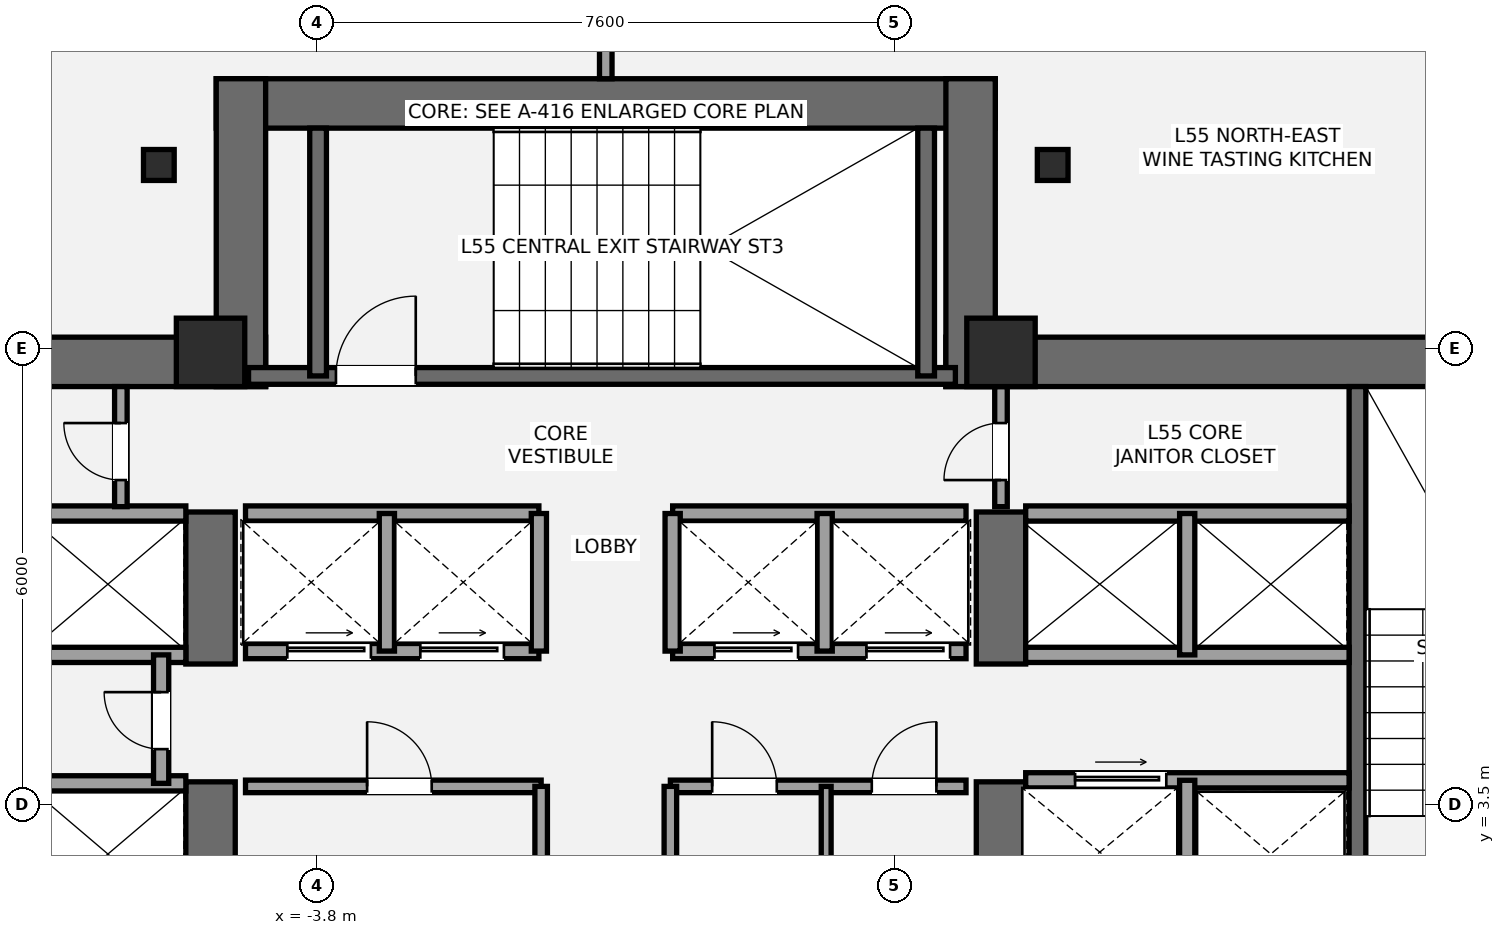
"""IFC4 building model, lengths in metres.
Left out: names, types, materials, properties, quantities, classifications, styles, units other than length and angle.
Written with IfcOpenShell. Run it as: python <this file> out.ifc"""

import sys

from ifc_helpers import new_model, si_unit, direction, frame, frame_2d, origin, origin_2d, place, context, subcontext, project, spatial, rectangle, i_section, extrude, element, fill, save


model = new_model("IFC4")
c1 = context("Model", 3, precision=1e-05, world=origin(), true_north=direction((0.0, 1.0)))
c2 = subcontext(c1, "Body", "Model", "MODEL_VIEW")
j1 = project(units=[si_unit("LENGTHUNIT", "METRE"), si_unit("PLANEANGLEUNIT", "RADIAN")], contexts=[c1])
p1 = place(None, origin())
s1 = spatial("IfcSite", under=j1, at=p1, CompositionType="ELEMENT")
p2 = place(p1, origin())
s2 = spatial("IfcBuilding", under=s1, at=p2, CompositionType="ELEMENT")
p3 = place(p2, frame((0.0, 0.0, 198.2)))
s3 = spatial("IfcBuildingStorey", under=s2, at=p3, CompositionType="ELEMENT", Elevation=198.2)
p4 = place(p3, frame((-13.8, 9.325, 0.0), z_axis=(0.0, 0.0, 1.0), x_axis=(1.0, 0.0, 0.0)))
e1 = element("IfcWall", 1, at=p4, inside=s3, PredefinedType="SHEAR", context=c2, shape_type="SweptSolid", body=[
    extrude(rectangle(XDim=9.325, YDim=0.65, at=frame_2d((4.663, 0.0))), origin(), (0.0, 0.0, 1.0), 3.2),
])
p5 = place(p3, frame((-5.2, 1.2, 0.0), z_axis=(0.0, 0.0, 1.0), x_axis=(0.0, 1.0, 0.0)))
e2 = element("IfcWall", 2, at=p5, inside=s3, PredefinedType="SHEAR", context=c2, shape_type="SweptSolid", body=[
    extrude(rectangle(XDim=2.6, YDim=0.65, at=frame_2d((1.3, 0.0))), origin(), (0.0, 0.0, 1.0), 3.2),
])
p6 = place(p3, frame((-5.2, 5.35, 0.0), z_axis=(0.0, 0.0, 1.0), x_axis=(0.0, 1.0, 0.0)))
e3 = element("IfcWall", 3, at=p6, inside=s3, PredefinedType="SHEAR", context=c2, shape_type="SweptSolid", body=[
    extrude(rectangle(XDim=2.0, YDim=0.65, at=frame_2d((1.0, 0.0))), origin(), (0.0, 0.0, 1.0), 3.2),
])
p7 = place(p3, frame((4.475, 9.325, 0.0), z_axis=(0.0, 0.0, 1.0), x_axis=(1.0, 0.0, 0.0)))
e4 = element("IfcWall", 4, at=p7, inside=s3, PredefinedType="SHEAR", context=c2, shape_type="SweptSolid", body=[
    extrude(rectangle(XDim=9.325, YDim=0.65, at=frame_2d((4.663, 0.0))), origin(), (0.0, 0.0, 1.0), 3.2),
])
p8 = place(p3, frame((5.2, 1.2, 0.0), z_axis=(0.0, 0.0, 1.0), x_axis=(0.0, 1.0, 0.0)))
e5 = element("IfcWall", 5, at=p8, inside=s3, PredefinedType="SHEAR", context=c2, shape_type="SweptSolid", body=[
    extrude(rectangle(XDim=2.6, YDim=0.65, at=frame_2d((1.3, 0.0))), origin(), (0.0, 0.0, 1.0), 3.2),
])
p9 = place(p3, frame((5.2, 5.35, 0.0), z_axis=(0.0, 0.0, 1.0), x_axis=(0.0, 1.0, 0.0)))
e6 = element("IfcWall", 6, at=p9, inside=s3, PredefinedType="SHEAR", context=c2, shape_type="SweptSolid", body=[
    extrude(rectangle(XDim=2.0, YDim=0.65, at=frame_2d((1.0, 0.0))), origin(), (0.0, 0.0, 1.0), 3.2),
])
p10 = place(p3, frame((9.89, 1.85, 0.0), z_axis=(0.0, 0.0, 1.0), x_axis=(0.0, 1.0, 0.0)))
e7 = element("IfcWall", 7, at=p10, inside=s3, PredefinedType="SHEAR", context=c2, shape_type="SweptSolid", body=[
    extrude(rectangle(XDim=7.15, YDim=0.22, at=frame_2d((3.575, 0.0))), origin(), (0.0, 0.0, 1.0), 3.2),
])
p11 = place(p3, frame((-5.125, 12.725, 0.0), z_axis=(0.0, 0.0, 1.0), x_axis=(1.0, 0.0, 0.0)))
e8 = element("IfcWall", 8, at=p11, inside=s3, PredefinedType="SHEAR", context=c2, shape_type="SweptSolid", body=[
    extrude(rectangle(XDim=10.25, YDim=0.65, at=frame_2d((5.125, 0.0))), origin(), (0.0, 0.0, 1.0), 3.2),
])
for number, where, z_axis, x_axis in (
    (9, (-4.8, 9.0, 0.0), (0.0, 0.0, 1.0), (0.0, 1.0, 0.0)),
    (10, (4.8, 9.0, 0.0), (0.0, 0.0, 1.0), (0.0, 1.0, 0.0)),
):
    element("IfcWall", number, at=place(p3, frame(where, z_axis=z_axis, x_axis=x_axis)), inside=s3, PredefinedType="SHEAR", context=c2, shape_type="SweptSolid", body=[
        extrude(rectangle(XDim=4.05, YDim=0.65, at=frame_2d((2.025, 0.0))), origin(), (0.0, 0.0, 1.0), 3.2),
    ])
p12 = place(p3, frame((-4.7, 9.14, 0.0), z_axis=(0.0, 0.0, 1.0), x_axis=(1.0, 0.0, 0.0)))
e11 = element("IfcWall", 11, at=p12, inside=s3, PredefinedType="SHEAR", context=c2, shape_type="SweptSolid", body=[
    extrude(rectangle(XDim=9.3, YDim=0.22, at=frame_2d((4.65, 0.0))), origin(), (0.0, 0.0, 1.0), 3.2),
])
p13 = place(p12, frame((1.15, 0.0, 0.0)))
e12 = element("IfcOpeningElement", 12, at=p13, cuts=e11, PredefinedType="OPENING", context=c2, shape_type="SweptSolid", body=[
    extrude(rectangle(XDim=1.05, YDim=2.15, at=frame_2d((0.525, 1.075))), frame((0.0, 0.12, 0.0), z_axis=(0.0, -1.0, 0.0), x_axis=(1.0, 0.0, 0.0)), (0.0, 0.0, 1.0), 0.24),
])
for number, where, z_axis, x_axis in (
    (13, (-3.785, 9.14, 0.0), (0.0, 0.0, 1.0), (0.0, 1.0, 0.0)),
    (14, (4.215, 9.14, 0.0), (0.0, 0.0, 1.0), (0.0, 1.0, 0.0)),
):
    element("IfcWall", number, at=place(p3, frame(where, z_axis=z_axis, x_axis=x_axis)), inside=s3, PredefinedType="SHEAR", context=c2, shape_type="SweptSolid", body=[
        extrude(rectangle(XDim=3.26, YDim=0.22, at=frame_2d((1.63, 0.0))), origin(), (0.0, 0.0, 1.0), 3.2),
    ])
for number, where, z_axis, x_axis in (
    (15, (-5.2, 9.45, 0.0), (0.0, 0.0, 1.0), (1.0, 0.0, 0.0)),
    (16, (5.2, 9.45, 0.0), (0.0, 0.0, 1.0), (1.0, 0.0, 0.0)),
):
    element("IfcColumn", number, at=place(p3, frame(where, z_axis=z_axis, x_axis=x_axis)), inside=s3, PredefinedType="COLUMN", context=c2, shape_type="SweptSolid", body=[
        extrude(rectangle(XDim=0.9, YDim=0.9, at=origin_2d()), origin(), (0.0, 0.0, 1.0), 3.2),
    ])
for number, where, z_axis, x_axis in (
    (17, (5.88, 11.915, 0.0), (0.0, 0.0, 1.0), (1.0, 0.0, 0.0)),
    (18, (-5.88, 11.915, 0.0), (0.0, 0.0, 1.0), (1.0, 0.0, 0.0)),
):
    element("IfcColumn", number, at=place(p3, frame(where, z_axis=z_axis, x_axis=x_axis)), inside=s3, PredefinedType="COLUMN", context=c2, shape_type="SweptSolid", body=[
        extrude(i_section(OverallWidth=0.404, OverallDepth=0.407, WebThickness=0.027, FlangeThickness=0.044, at=origin_2d()), origin(), (0.0, 0.0, 1.0), 3.2),
    ])
for number, where, z_axis, x_axis in (
    (19, (-9.78, 3.78, 0.0), (0.0, 0.0, 1.0), (1.0, 0.0, 0.0)),
    (20, (-9.78, 5.47, 0.0), (0.0, 0.0, 1.0), (1.0, 0.0, 0.0)),
    (21, (-9.78, 7.33, 0.0), (0.0, 0.0, 1.0), (1.0, 0.0, 0.0)),
):
    element("IfcWall", number, at=place(p3, frame(where, z_axis=z_axis, x_axis=x_axis)), inside=s3, PredefinedType="SOLIDWALL", context=c2, shape_type="SweptSolid", body=[
        extrude(rectangle(XDim=4.255, YDim=0.2, at=frame_2d((2.127, 0.0))), origin(), (0.0, 0.0, 1.0), 2.96),
    ])
p14 = place(p3, frame((-5.85, 3.78, 0.0), z_axis=(0.0, 0.0, 1.0), x_axis=(0.0, 1.0, 0.0)))
e22 = element("IfcWall", 22, at=p14, inside=s3, PredefinedType="SOLIDWALL", context=c2, shape_type="SweptSolid", body=[
    extrude(rectangle(XDim=1.69, YDim=0.2, at=frame_2d((0.845, 0.0))), origin(), (0.0, 0.0, 1.0), 2.96),
])
p15 = place(p14, frame((0.45, 0.0, 0.0)))
e23 = element("IfcOpeningElement", 23, at=p15, cuts=e22, PredefinedType="OPENING", context=c2, shape_type="SweptSolid", body=[
    extrude(rectangle(XDim=0.75, YDim=2.1, at=frame_2d((0.375, 1.05))), frame((0.0, 0.11, 0.0), z_axis=(0.0, -1.0, 0.0), x_axis=(1.0, 0.0, 0.0)), (0.0, 0.0, 1.0), 0.22),
])
p16 = place(p3, frame((5.525, 3.82, 0.0), z_axis=(0.0, 0.0, 1.0), x_axis=(1.0, 0.0, 0.0)))
e24 = element("IfcWall", 24, at=p16, inside=s3, PredefinedType="SOLIDWALL", context=c2, shape_type="SweptSolid", body=[
    extrude(rectangle(XDim=4.255, YDim=0.2, at=frame_2d((2.127, 0.0))), origin(), (0.0, 0.0, 1.0), 2.96),
])
p17 = place(p16, frame((0.65, 0.0, 0.0)))
e25 = element("IfcOpeningElement", 25, at=p17, cuts=e24, PredefinedType="OPENING", context=c2, shape_type="SweptSolid", body=[
    extrude(rectangle(XDim=1.2, YDim=2.2, at=frame_2d((0.6, 1.1))), frame((0.0, 0.11, 0.0), z_axis=(0.0, -1.0, 0.0), x_axis=(1.0, 0.0, 0.0)), (0.0, 0.0, 1.0), 0.22),
])
p18 = place(p3, frame((7.65, 1.85, 0.0), z_axis=(0.0, 0.0, 1.0), x_axis=(0.0, 1.0, 0.0)))
e26 = element("IfcWall", 26, at=p18, inside=s3, PredefinedType="SOLIDWALL", context=c2, shape_type="SweptSolid", body=[
    extrude(rectangle(XDim=1.97, YDim=0.2, at=frame_2d((0.985, 0.0))), origin(), (0.0, 0.0, 1.0), 2.96),
])
for number, where, z_axis, x_axis in (
    (27, (5.525, 5.47, 0.0), (0.0, 0.0, 1.0), (1.0, 0.0, 0.0)),
    (28, (5.525, 7.33, 0.0), (0.0, 0.0, 1.0), (1.0, 0.0, 0.0)),
):
    element("IfcWall", number, at=place(p3, frame(where, z_axis=z_axis, x_axis=x_axis)), inside=s3, PredefinedType="SOLIDWALL", context=c2, shape_type="SweptSolid", body=[
        extrude(rectangle(XDim=4.255, YDim=0.2, at=frame_2d((2.127, 0.0))), origin(), (0.0, 0.0, 1.0), 2.96),
    ])
p19 = place(p3, frame((7.65, 5.47, 0.0), z_axis=(0.0, 0.0, 1.0), x_axis=(0.0, 1.0, 0.0)))
e29 = element("IfcWall", 29, at=p19, inside=s3, PredefinedType="SOLIDWALL", context=c2, shape_type="SweptSolid", body=[
    extrude(rectangle(XDim=1.86, YDim=0.2, at=frame_2d((0.93, 0.0))), origin(), (0.0, 0.0, 1.0), 2.96),
])
p20 = place(p3, frame((-4.74, 3.74, 0.0), z_axis=(0.0, 0.0, 1.0), x_axis=(1.0, 0.0, 0.0)))
e30 = element("IfcWall", 30, at=p20, inside=s3, PredefinedType="PARTITIONING", context=c2, shape_type="SweptSolid", body=[
    extrude(rectangle(XDim=3.89, YDim=0.165, at=frame_2d((1.945, 0.0))), origin(), (0.0, 0.0, 1.0), 2.96),
])
p21 = place(p20, frame((1.6, 0.0, 0.0)))
e31 = element("IfcOpeningElement", 31, at=p21, cuts=e30, PredefinedType="OPENING", context=c2, shape_type="SweptSolid", body=[
    extrude(rectangle(XDim=0.85, YDim=2.1, at=frame_2d((0.425, 1.05))), frame((0.0, 0.093, 0.0), z_axis=(0.0, -1.0, 0.0), x_axis=(1.0, 0.0, 0.0)), (0.0, 0.0, 1.0), 0.185),
])
p22 = place(p3, frame((-0.85, 1.92, 0.0), z_axis=(0.0, 0.0, 1.0), x_axis=(0.0, 1.0, 0.0)))
e32 = element("IfcWall", 32, at=p22, inside=s3, PredefinedType="PARTITIONING", context=c2, shape_type="SweptSolid", body=[
    extrude(rectangle(XDim=1.82, YDim=0.165, at=frame_2d((0.91, 0.0))), origin(), (0.0, 0.0, 1.0), 2.96),
])
p23 = place(p3, frame((0.85, 3.74, 0.0), z_axis=(0.0, 0.0, 1.0), x_axis=(1.0, 0.0, 0.0)))
e33 = element("IfcWall", 33, at=p23, inside=s3, PredefinedType="PARTITIONING", context=c2, shape_type="SweptSolid", body=[
    extrude(rectangle(XDim=3.89, YDim=0.165, at=frame_2d((1.945, 0.0))), origin(), (0.0, 0.0, 1.0), 2.96),
])
p24 = place(p23, frame((0.55, 0.0, 0.0)))
e34 = element("IfcOpeningElement", 34, at=p24, cuts=e33, PredefinedType="OPENING", context=c2, shape_type="SweptSolid", body=[
    extrude(rectangle(XDim=0.85, YDim=2.1, at=frame_2d((0.425, 1.05))), frame((0.0, 0.093, 0.0), z_axis=(0.0, -1.0, 0.0), x_axis=(1.0, 0.0, 0.0)), (0.0, 0.0, 1.0), 0.185),
])
p25 = place(p23, frame((2.65, 0.0, 0.0)))
e35 = element("IfcOpeningElement", 35, at=p25, cuts=e33, PredefinedType="OPENING", context=c2, shape_type="SweptSolid", body=[
    extrude(rectangle(XDim=0.85, YDim=2.1, at=frame_2d((0.425, 1.05))), frame((0.0, 0.093, 0.0), z_axis=(0.0, -1.0, 0.0), x_axis=(1.0, 0.0, 0.0)), (0.0, 0.0, 1.0), 0.185),
])
p26 = place(p3, frame((0.85, 1.92, 0.0), z_axis=(0.0, 0.0, 1.0), x_axis=(0.0, 1.0, 0.0)))
e36 = element("IfcWall", 36, at=p26, inside=s3, PredefinedType="PARTITIONING", context=c2, shape_type="SweptSolid", body=[
    extrude(rectangle(XDim=1.82, YDim=0.165, at=frame_2d((0.91, 0.0))), origin(), (0.0, 0.0, 1.0), 2.96),
])
p27 = place(p3, frame((2.9, 1.92, 0.0), z_axis=(0.0, 0.0, 1.0), x_axis=(0.0, 1.0, 0.0)))
e37 = element("IfcWall", 37, at=p27, inside=s3, PredefinedType="PARTITIONING", context=c2, shape_type="SweptSolid", body=[
    extrude(rectangle(XDim=1.82, YDim=0.13, at=frame_2d((0.91, 0.0))), origin(), (0.0, 0.0, 1.0), 2.96),
])
p28 = place(p3, frame((-4.74, 5.52, 0.0), z_axis=(0.0, 0.0, 1.0), x_axis=(1.0, 0.0, 0.0)))
e38 = element("IfcWall", 38, at=p28, inside=s3, PredefinedType="SOLIDWALL", context=c2, shape_type="SweptSolid", body=[
    extrude(rectangle(XDim=3.86, YDim=0.2, at=frame_2d((1.93, 0.0))), origin(), (0.0, 0.0, 1.0), 2.96),
])
p29 = place(p28, frame((0.55, 0.0, 0.0)))
e39 = element("IfcOpeningElement", 39, at=p29, cuts=e38, PredefinedType="OPENING", context=c2, shape_type="SweptSolid", body=[
    extrude(rectangle(XDim=1.1, YDim=2.2, at=frame_2d((0.55, 1.1))), frame((0.0, 0.11, 0.0), z_axis=(0.0, -1.0, 0.0), x_axis=(1.0, 0.0, 0.0)), (0.0, 0.0, 1.0), 0.22),
])
p30 = place(p28, frame((2.3, 0.0, 0.0)))
e40 = element("IfcOpeningElement", 40, at=p30, cuts=e38, PredefinedType="OPENING", context=c2, shape_type="SweptSolid", body=[
    extrude(rectangle(XDim=1.1, YDim=2.2, at=frame_2d((0.55, 1.1))), frame((0.0, 0.11, 0.0), z_axis=(0.0, -1.0, 0.0), x_axis=(1.0, 0.0, 0.0)), (0.0, 0.0, 1.0), 0.22),
])
p31 = place(p3, frame((0.88, 5.52, 0.0), z_axis=(0.0, 0.0, 1.0), x_axis=(1.0, 0.0, 0.0)))
e41 = element("IfcWall", 41, at=p31, inside=s3, PredefinedType="SOLIDWALL", context=c2, shape_type="SweptSolid", body=[
    extrude(rectangle(XDim=3.86, YDim=0.2, at=frame_2d((1.93, 0.0))), origin(), (0.0, 0.0, 1.0), 2.96),
])
p32 = place(p31, frame((0.55, 0.0, 0.0)))
e42 = element("IfcOpeningElement", 42, at=p32, cuts=e41, PredefinedType="OPENING", context=c2, shape_type="SweptSolid", body=[
    extrude(rectangle(XDim=1.1, YDim=2.2, at=frame_2d((0.55, 1.1))), frame((0.0, 0.11, 0.0), z_axis=(0.0, -1.0, 0.0), x_axis=(1.0, 0.0, 0.0)), (0.0, 0.0, 1.0), 0.22),
])
p33 = place(p31, frame((2.55, 0.0, 0.0)))
e43 = element("IfcOpeningElement", 43, at=p33, cuts=e41, PredefinedType="OPENING", context=c2, shape_type="SweptSolid", body=[
    extrude(rectangle(XDim=1.1, YDim=2.2, at=frame_2d((0.55, 1.1))), frame((0.0, 0.11, 0.0), z_axis=(0.0, -1.0, 0.0), x_axis=(1.0, 0.0, 0.0)), (0.0, 0.0, 1.0), 0.22),
])
for number, where, z_axis, x_axis in (
    (44, (-4.74, 7.33, 0.0), (0.0, 0.0, 1.0), (1.0, 0.0, 0.0)),
    (45, (0.88, 7.33, 0.0), (0.0, 0.0, 1.0), (1.0, 0.0, 0.0)),
):
    element("IfcWall", number, at=place(p3, frame(where, z_axis=z_axis, x_axis=x_axis)), inside=s3, PredefinedType="SOLIDWALL", context=c2, shape_type="SweptSolid", body=[
        extrude(rectangle(XDim=3.86, YDim=0.2, at=frame_2d((1.93, 0.0))), origin(), (0.0, 0.0, 1.0), 2.96),
    ])
for number, where, z_axis, x_axis in (
    (46, (-2.88, 5.52, 0.0), (0.0, 0.0, 1.0), (0.0, 1.0, 0.0)),
    (47, (2.88, 5.52, 0.0), (0.0, 0.0, 1.0), (0.0, 1.0, 0.0)),
    (48, (-0.88, 5.52, 0.0), (0.0, 0.0, 1.0), (0.0, 1.0, 0.0)),
    (49, (0.88, 5.52, 0.0), (0.0, 0.0, 1.0), (0.0, 1.0, 0.0)),
):
    element("IfcWall", number, at=place(p3, frame(where, z_axis=z_axis, x_axis=x_axis)), inside=s3, PredefinedType="SOLIDWALL", context=c2, shape_type="SweptSolid", body=[
        extrude(rectangle(XDim=1.81, YDim=0.2, at=frame_2d((0.905, 0.0))), origin(), (0.0, 0.0, 1.0), 2.96),
    ])
p34 = place(p3, frame((-6.38, 7.42, 0.0), z_axis=(0.0, 0.0, 1.0), x_axis=(0.0, 1.0, 0.0)))
e50 = element("IfcWall", 50, at=p34, inside=s3, PredefinedType="PARTITIONING", context=c2, shape_type="SweptSolid", body=[
    extrude(rectangle(XDim=1.58, YDim=0.165, at=frame_2d((0.79, 0.0))), origin(), (0.0, 0.0, 1.0), 2.96),
])
p35 = place(p34, frame((0.35, 0.0, 0.0)))
e51 = element("IfcOpeningElement", 51, at=p35, cuts=e50, PredefinedType="OPENING", context=c2, shape_type="SweptSolid", body=[
    extrude(rectangle(XDim=0.75, YDim=2.1, at=frame_2d((0.375, 1.05))), frame((0.0, 0.093, 0.0), z_axis=(0.0, -1.0, 0.0), x_axis=(1.0, 0.0, 0.0)), (0.0, 0.0, 1.0), 0.185),
])
p36 = place(p3, frame((5.2, 7.42, 0.0), z_axis=(0.0, 0.0, 1.0), x_axis=(0.0, 1.0, 0.0)))
e52 = element("IfcWall", 52, at=p36, inside=s3, PredefinedType="PARTITIONING", context=c2, shape_type="SweptSolid", body=[
    extrude(rectangle(XDim=1.58, YDim=0.165, at=frame_2d((0.79, 0.0))), origin(), (0.0, 0.0, 1.0), 2.96),
])
p37 = place(p36, frame((0.35, 0.0, 0.0)))
e53 = element("IfcOpeningElement", 53, at=p37, cuts=e52, PredefinedType="OPENING", context=c2, shape_type="SweptSolid", body=[
    extrude(rectangle(XDim=0.75, YDim=2.1, at=frame_2d((0.375, 1.05))), frame((0.0, 0.093, 0.0), z_axis=(0.0, -1.0, 0.0), x_axis=(1.0, 0.0, 0.0)), (0.0, 0.0, 1.0), 0.185),
])
p38 = place(p3, frame((0.0, 13.05, 0.0), z_axis=(0.0, 0.0, 1.0), x_axis=(0.0, 1.0, 0.0)))
e54 = element("IfcWall", 54, at=p38, inside=s3, PredefinedType="PARTITIONING", context=c2, shape_type="SweptSolid", body=[
    extrude(rectangle(XDim=2.681, YDim=0.165, at=frame_2d((1.341, 0.0))), origin(), (0.0, 0.0, 1.0), 2.96),
])
p39 = place(p13, origin())
e55 = element("IfcDoor", 55, at=p39, inside=s3, OperationType="SINGLE_SWING_RIGHT", PredefinedType="DOOR", context=c2, shape_type="SweptSolid", body=[
    extrude(rectangle(XDim=1.05, YDim=2.15, at=frame_2d((0.525, 1.075))), frame((0.0, 0.025, 0.0), z_axis=(0.0, -1.0, 0.0), x_axis=(1.0, 0.0, 0.0)), (0.0, 0.0, 1.0), 0.05),
])
fill(e12, e55)
p40 = place(p15, origin())
e56 = element("IfcDoor", 56, at=p40, inside=s3, OperationType="SINGLE_SWING_RIGHT", PredefinedType="DOOR", context=c2, shape_type="SweptSolid", body=[
    extrude(rectangle(XDim=0.75, YDim=2.1, at=frame_2d((0.375, 1.05))), frame((0.0, 0.025, 0.0), z_axis=(0.0, -1.0, 0.0), x_axis=(1.0, 0.0, 0.0)), (0.0, 0.0, 1.0), 0.05),
])
fill(e23, e56)
p41 = place(p17, origin())
e57 = element("IfcDoor", 57, at=p41, inside=s3, OperationType="SLIDING_TO_RIGHT", PredefinedType="DOOR", context=c2, shape_type="SweptSolid", body=[
    extrude(rectangle(XDim=1.2, YDim=2.2, at=frame_2d((0.6, 1.1))), frame((0.0, 0.025, 0.0), z_axis=(0.0, -1.0, 0.0), x_axis=(1.0, 0.0, 0.0)), (0.0, 0.0, 1.0), 0.05),
])
fill(e25, e57)
p42 = place(p21, origin())
e58 = element("IfcDoor", 58, at=p42, inside=s3, OperationType="SINGLE_SWING_LEFT", PredefinedType="DOOR", context=c2, shape_type="SweptSolid", body=[
    extrude(rectangle(XDim=0.85, YDim=2.1, at=frame_2d((0.425, 1.05))), frame((0.0, 0.025, 0.0), z_axis=(0.0, -1.0, 0.0), x_axis=(1.0, 0.0, 0.0)), (0.0, 0.0, 1.0), 0.05),
])
fill(e31, e58)
p43 = place(p24, origin())
e59 = element("IfcDoor", 59, at=p43, inside=s3, OperationType="SINGLE_SWING_LEFT", PredefinedType="DOOR", context=c2, shape_type="SweptSolid", body=[
    extrude(rectangle(XDim=0.85, YDim=2.1, at=frame_2d((0.425, 1.05))), frame((0.0, 0.025, 0.0), z_axis=(0.0, -1.0, 0.0), x_axis=(1.0, 0.0, 0.0)), (0.0, 0.0, 1.0), 0.05),
])
fill(e34, e59)
p44 = place(p25, origin())
e60 = element("IfcDoor", 60, at=p44, inside=s3, OperationType="SINGLE_SWING_RIGHT", PredefinedType="DOOR", context=c2, shape_type="SweptSolid", body=[
    extrude(rectangle(XDim=0.85, YDim=2.1, at=frame_2d((0.425, 1.05))), frame((0.0, 0.025, 0.0), z_axis=(0.0, -1.0, 0.0), x_axis=(1.0, 0.0, 0.0)), (0.0, 0.0, 1.0), 0.05),
])
fill(e35, e60)
p45 = place(p29, origin())
e61 = element("IfcDoor", 61, at=p45, inside=s3, OperationType="SLIDING_TO_LEFT", PredefinedType="DOOR", context=c2, shape_type="SweptSolid", body=[
    extrude(rectangle(XDim=1.1, YDim=2.2, at=frame_2d((0.55, 1.1))), frame((0.0, 0.025, 0.0), z_axis=(0.0, -1.0, 0.0), x_axis=(1.0, 0.0, 0.0)), (0.0, 0.0, 1.0), 0.05),
])
fill(e39, e61)
p46 = place(p30, origin())
e62 = element("IfcDoor", 62, at=p46, inside=s3, OperationType="SLIDING_TO_LEFT", PredefinedType="DOOR", context=c2, shape_type="SweptSolid", body=[
    extrude(rectangle(XDim=1.1, YDim=2.2, at=frame_2d((0.55, 1.1))), frame((0.0, 0.025, 0.0), z_axis=(0.0, -1.0, 0.0), x_axis=(1.0, 0.0, 0.0)), (0.0, 0.0, 1.0), 0.05),
])
fill(e40, e62)
p47 = place(p32, origin())
e63 = element("IfcDoor", 63, at=p47, inside=s3, OperationType="SLIDING_TO_LEFT", PredefinedType="DOOR", context=c2, shape_type="SweptSolid", body=[
    extrude(rectangle(XDim=1.1, YDim=2.2, at=frame_2d((0.55, 1.1))), frame((0.0, 0.025, 0.0), z_axis=(0.0, -1.0, 0.0), x_axis=(1.0, 0.0, 0.0)), (0.0, 0.0, 1.0), 0.05),
])
fill(e42, e63)
p48 = place(p33, origin())
e64 = element("IfcDoor", 64, at=p48, inside=s3, OperationType="SLIDING_TO_LEFT", PredefinedType="DOOR", context=c2, shape_type="SweptSolid", body=[
    extrude(rectangle(XDim=1.1, YDim=2.2, at=frame_2d((0.55, 1.1))), frame((0.0, 0.025, 0.0), z_axis=(0.0, -1.0, 0.0), x_axis=(1.0, 0.0, 0.0)), (0.0, 0.0, 1.0), 0.05),
])
fill(e43, e64)
p49 = place(p35, origin())
e65 = element("IfcDoor", 65, at=p49, inside=s3, OperationType="SINGLE_SWING_RIGHT", PredefinedType="DOOR", context=c2, shape_type="SweptSolid", body=[
    extrude(rectangle(XDim=0.75, YDim=2.1, at=frame_2d((0.375, 1.05))), frame((0.0, 0.025, 0.0), z_axis=(0.0, -1.0, 0.0), x_axis=(1.0, 0.0, 0.0)), (0.0, 0.0, 1.0), 0.05),
])
fill(e51, e65)
p50 = place(p37, origin())
e66 = element("IfcDoor", 66, at=p50, inside=s3, OperationType="SINGLE_SWING_LEFT", PredefinedType="DOOR", context=c2, shape_type="SweptSolid", body=[
    extrude(rectangle(XDim=0.75, YDim=2.1, at=frame_2d((0.375, 1.05))), frame((0.0, 0.025, 0.0), z_axis=(0.0, -1.0, 0.0), x_axis=(1.0, 0.0, 0.0)), (0.0, 0.0, 1.0), 0.05),
])
fill(e53, e66)
save(model, sys.argv[1])
